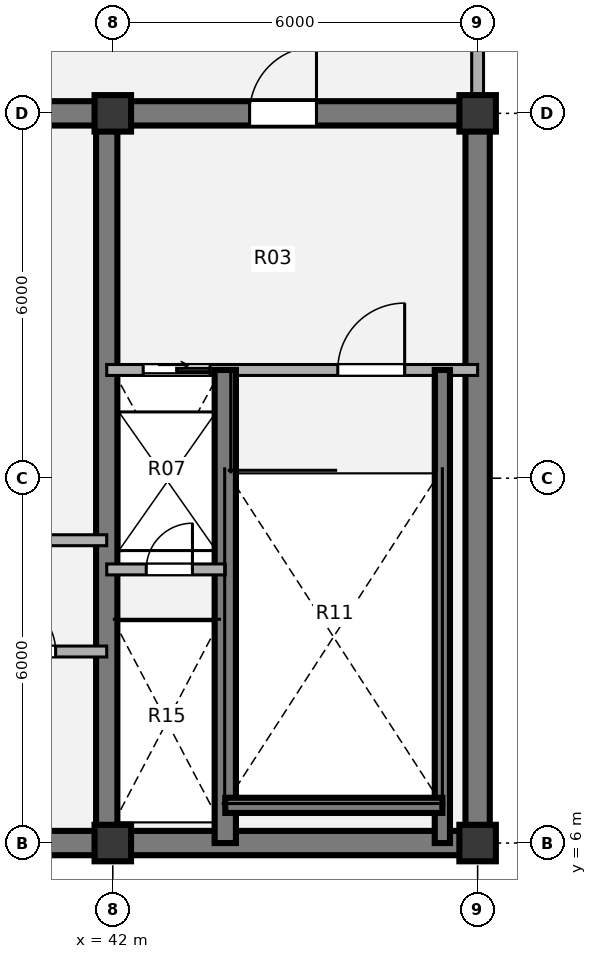
"""IFC4 building model, lengths in metres.
Left out: names, types, materials, properties, quantities, classifications, styles, units other than length and angle.
Written with IfcOpenShell. Run it as: python <this file> out.ifc"""

import sys

from ifc_helpers import new_model, si_unit, direction, frame, frame_2d, origin, origin_2d, place, context, subcontext, project, spatial, rectangle, extrude, source, transform, mapped, element, fill, save


model = new_model("IFC4")
c1 = context("Model", 3, precision=1e-05, world=origin(), true_north=direction((0.0, 1.0)))
c2 = subcontext(c1, "Body", "Model", "MODEL_VIEW")
j1 = project(units=[si_unit("LENGTHUNIT", "METRE"), si_unit("PLANEANGLEUNIT", "RADIAN")], contexts=[c1])
p1 = place(None, origin())
s1 = spatial("IfcSite", under=j1, at=p1, CompositionType="ELEMENT")
p2 = place(p1, origin())
s2 = spatial("IfcBuilding", under=s1, at=p2, CompositionType="ELEMENT")
p3 = place(p2, frame((0.0, 0.0, 315.72)))
s3 = spatial("IfcBuildingStorey", under=s2, at=p3, CompositionType="ELEMENT", Elevation=315.72)
m1 = source(origin(), c2, "Body", "SweptSolid", [
    extrude(rectangle(XDim=0.6, YDim=0.6, at=origin_2d()), origin(), (0.0, 0.0, 1.0), 3.96),
])
for number, where, z_axis, x_axis in (
    (1, (42.0, 6.0, 0.0), (0.0, 0.0, 1.0), (1.0, 0.0, 0.0)),
    (2, (48.0, 6.0, 0.0), (0.0, 0.0, 1.0), (1.0, 0.0, 0.0)),
    (3, (42.0, 18.0, 0.0), (0.0, 0.0, 1.0), (1.0, 0.0, 0.0)),
    (4, (48.0, 18.0, 0.0), (0.0, 0.0, 1.0), (1.0, 0.0, 0.0)),
):
    element("IfcColumn", number, at=place(p3, frame(where, z_axis=z_axis, x_axis=x_axis)), inside=s3, PredefinedType="COLUMN", context=c2, shape_type="MappedRepresentation", body=[
        mapped(m1, transform((0.0, 0.0, 0.0), x_axis=(1.0, 0.0, 0.0), y_axis=(0.0, 1.0, 0.0), z_axis=(0.0, 0.0, 1.0), scale=1.0)),
    ])
p4 = place(p3, frame((48.2, 6.0, 0.0), z_axis=(0.0, 0.0, 1.0), x_axis=(-1.0, 0.0, 0.0)))
e5 = element("IfcWall", 5, at=p4, inside=s3, PredefinedType="SHEAR", context=c2, shape_type="SweptSolid", body=[
    extrude(rectangle(XDim=24.4, YDim=0.4, at=frame_2d((12.2, 0.0))), origin(), (0.0, 0.0, 1.0), 3.96),
])
p5 = place(p3, frame((48.0, 18.0, 0.0), z_axis=(0.0, 0.0, 1.0), x_axis=(0.0, -1.0, 0.0)))
e6 = element("IfcWall", 6, at=p5, inside=s3, PredefinedType="SHEAR", context=c2, shape_type="SweptSolid", body=[
    extrude(rectangle(XDim=12.0, YDim=0.4, at=frame_2d((6.0, 0.0))), origin(), (0.0, 0.0, 1.0), 3.96),
])
p6 = place(p3, frame((38.8, 18.0, 0.0), z_axis=(0.0, 0.0, 1.0), x_axis=(1.0, 0.0, 0.0)))
e7 = element("IfcWall", 7, at=p6, inside=s3, PredefinedType="SHEAR", context=c2, shape_type="SweptSolid", body=[
    extrude(rectangle(XDim=9.4, YDim=0.4, at=frame_2d((4.7, 0.0))), origin(), (0.0, 0.0, 1.0), 3.96),
])
p7 = place(p6, frame((5.45, 0.0, 0.0)))
e8 = element("IfcOpeningElement", 8, at=p7, cuts=e7, PredefinedType="OPENING", context=c2, shape_type="SweptSolid", body=[
    extrude(rectangle(XDim=1.1, YDim=2.1, at=origin_2d()), frame((0.55, 0.21, 1.05), z_axis=(0.0, -1.0, 0.0), x_axis=(1.0, 0.0, 0.0)), (0.0, 0.0, 1.0), 0.42),
])
p8 = place(p3, frame((41.9, 18.0, 0.0), z_axis=(0.0, 0.0, 1.0), x_axis=(0.0, -1.0, 0.0)))
e9 = element("IfcWall", 9, at=p8, inside=s3, PredefinedType="SHEAR", context=c2, shape_type="SweptSolid", body=[
    extrude(rectangle(XDim=12.0, YDim=0.35, at=frame_2d((6.0, 0.0))), origin(), (0.0, 0.0, 1.0), 3.96),
])
p9 = place(p3, frame((48.0, 21.05, 0.0), z_axis=(0.0, 0.0, 1.0), x_axis=(0.0, -1.0, 0.0)))
e10 = element("IfcWall", 10, at=p9, inside=s3, PredefinedType="SOLIDWALL", context=c2, shape_type="SweptSolid", body=[
    extrude(rectangle(XDim=2.77, YDim=0.195, at=frame_2d((1.385, 0.0))), origin(), (0.0, 0.0, 1.0), 2.828),
])
p10 = place(p3, frame((39.35, 10.98, 0.0), z_axis=(0.0, 0.0, 1.0), x_axis=(1.0, 0.0, 0.0)))
e11 = element("IfcWall", 11, at=p10, inside=s3, PredefinedType="PARTITIONING", context=c2, shape_type="SweptSolid", body=[
    extrude(rectangle(XDim=2.55, YDim=0.18, at=frame_2d((1.275, 0.0))), origin(), (0.0, 0.0, 1.0), 3.61),
])
p11 = place(p3, frame((39.35, 9.15, 0.0), z_axis=(0.0, 0.0, 1.0), x_axis=(1.0, 0.0, 0.0)))
e12 = element("IfcWall", 12, at=p11, inside=s3, PredefinedType="PARTITIONING", context=c2, shape_type="SweptSolid", body=[
    extrude(rectangle(XDim=2.55, YDim=0.18, at=frame_2d((1.275, 0.0))), origin(), (0.0, 0.0, 1.0), 3.61),
])
p12 = place(p11, frame((0.85, 0.0, 0.0)))
e13 = element("IfcOpeningElement", 13, at=p12, cuts=e12, PredefinedType="OPENING", context=c2, shape_type="SweptSolid", body=[
    extrude(rectangle(XDim=0.86, YDim=2.1, at=origin_2d()), frame((0.43, 0.1, 1.05), z_axis=(0.0, -1.0, 0.0), x_axis=(1.0, 0.0, 0.0)), (0.0, 0.0, 1.0), 0.2),
])
p13 = place(p3, frame((41.9, 13.78, 0.0), z_axis=(0.0, 0.0, 1.0), x_axis=(1.0, 0.0, 0.0)))
e14 = element("IfcWall", 14, at=p13, inside=s3, PredefinedType="PARTITIONING", context=c2, shape_type="SweptSolid", body=[
    extrude(rectangle(XDim=6.1, YDim=0.18, at=frame_2d((3.05, 0.0))), origin(), (0.0, 0.0, 1.0), 3.61),
])
p14 = place(p13, frame((0.6, 0.0, 0.0)))
e15 = element("IfcOpeningElement", 15, at=p14, cuts=e14, PredefinedType="OPENING", context=c2, shape_type="SweptSolid", body=[
    extrude(rectangle(XDim=1.1, YDim=2.1, at=origin_2d()), frame((0.55, 0.1, 1.05), z_axis=(0.0, -1.0, 0.0), x_axis=(1.0, 0.0, 0.0)), (0.0, 0.0, 1.0), 0.2),
])
p15 = place(p13, frame((3.8, 0.0, 0.0)))
e16 = element("IfcOpeningElement", 16, at=p15, cuts=e14, PredefinedType="OPENING", context=c2, shape_type="SweptSolid", body=[
    extrude(rectangle(XDim=1.1, YDim=2.1, at=origin_2d()), frame((0.55, 0.1, 1.05), z_axis=(0.0, -1.0, 0.0), x_axis=(1.0, 0.0, 0.0)), (0.0, 0.0, 1.0), 0.2),
])
p16 = place(p3, frame((43.85, 6.0, 0.0), z_axis=(0.0, 0.0, 1.0), x_axis=(0.0, 1.0, 0.0)))
e17 = element("IfcWall", 17, at=p16, inside=s3, PredefinedType="SHEAR", context=c2, shape_type="SweptSolid", body=[
    extrude(rectangle(XDim=7.78, YDim=0.35, at=frame_2d((3.89, 0.0))), origin(), (0.0, 0.0, 1.0), 3.96),
])
p17 = place(p3, frame((47.42, 6.0, 0.0), z_axis=(0.0, 0.0, 1.0), x_axis=(0.0, 1.0, 0.0)))
e18 = element("IfcWall", 18, at=p17, inside=s3, PredefinedType="SHEAR", context=c2, shape_type="SweptSolid", body=[
    extrude(rectangle(XDim=7.78, YDim=0.25, at=frame_2d((3.89, 0.0))), origin(), (0.0, 0.0, 1.0), 3.96),
])
p18 = place(p3, frame((43.85, 6.62, 0.0), z_axis=(0.0, 0.0, 1.0), x_axis=(1.0, 0.0, 0.0)))
e19 = element("IfcWall", 19, at=p18, inside=s3, PredefinedType="SHEAR", context=c2, shape_type="SweptSolid", body=[
    extrude(rectangle(XDim=3.57, YDim=0.25, at=frame_2d((1.785, 0.0))), origin(), (0.0, 0.0, 1.0), 3.96),
])
p19 = place(p3, frame((41.9, 10.5, 0.0), z_axis=(0.0, 0.0, 1.0), x_axis=(1.0, 0.0, 0.0)))
e20 = element("IfcWall", 20, at=p19, inside=s3, PredefinedType="PARTITIONING", context=c2, shape_type="SweptSolid", body=[
    extrude(rectangle(XDim=1.95, YDim=0.18, at=frame_2d((0.975, 0.0))), origin(), (0.0, 0.0, 1.0), 3.61),
])
p20 = place(p19, frame((0.65, 0.0, 0.0)))
e21 = element("IfcOpeningElement", 21, at=p20, cuts=e20, PredefinedType="OPENING", context=c2, shape_type="SweptSolid", body=[
    extrude(rectangle(XDim=0.76, YDim=2.05, at=origin_2d()), frame((0.38, 0.1, 1.025), z_axis=(0.0, -1.0, 0.0), x_axis=(1.0, 0.0, 0.0)), (0.0, 0.0, 1.0), 0.2),
])
m2 = source(origin(), c2, "Body", "SweptSolid", [
    extrude(rectangle(XDim=0.86, YDim=2.1, at=origin_2d()), frame((0.43, 0.025, 1.05), z_axis=(0.0, -1.0, 0.0), x_axis=(1.0, 0.0, 0.0)), (0.0, 0.0, 1.0), 0.05),
])
p21 = place(p12, origin())
e22 = element("IfcDoor", 22, at=p21, inside=s3, OperationType="SINGLE_SWING_LEFT", PredefinedType="DOOR", context=c2, shape_type="MappedRepresentation", body=[
    mapped(m2, transform((0.0, 0.0, 0.0), x_axis=(1.0, 0.0, 0.0), y_axis=(0.0, 1.0, 0.0), z_axis=(0.0, 0.0, 1.0), scale=1.0)),
])
fill(e13, e22)
m3 = source(origin(), c2, "Body", "SweptSolid", [
    extrude(rectangle(XDim=1.1, YDim=2.1, at=origin_2d()), frame((0.55, 0.025, 1.05), z_axis=(0.0, -1.0, 0.0), x_axis=(1.0, 0.0, 0.0)), (0.0, 0.0, 1.0), 0.05),
])
p22 = place(p14, origin())
e23 = element("IfcDoor", 23, at=p22, inside=s3, OperationType="SLIDING_TO_RIGHT", PredefinedType="DOOR", context=c2, shape_type="MappedRepresentation", body=[
    mapped(m3, transform((0.0, 0.0, 0.0), x_axis=(1.0, 0.0, 0.0), y_axis=(0.0, 1.0, 0.0), z_axis=(0.0, 0.0, 1.0), scale=1.0)),
])
fill(e15, e23)
m4 = source(origin(), c2, "Body", "SweptSolid", [
    extrude(rectangle(XDim=1.1, YDim=2.1, at=origin_2d()), frame((0.55, 0.025, 1.05), z_axis=(0.0, -1.0, 0.0), x_axis=(1.0, 0.0, 0.0)), (0.0, 0.0, 1.0), 0.05),
])
p23 = place(p15, origin())
e24 = element("IfcDoor", 24, at=p23, inside=s3, OperationType="SINGLE_SWING_RIGHT", PredefinedType="DOOR", context=c2, shape_type="MappedRepresentation", body=[
    mapped(m4, transform((0.0, 0.0, 0.0), x_axis=(1.0, 0.0, 0.0), y_axis=(0.0, 1.0, 0.0), z_axis=(0.0, 0.0, 1.0), scale=1.0)),
])
fill(e16, e24)
m5 = source(origin(), c2, "Body", "SweptSolid", [
    extrude(rectangle(XDim=0.76, YDim=2.05, at=origin_2d()), frame((0.38, 0.025, 1.025), z_axis=(0.0, -1.0, 0.0), x_axis=(1.0, 0.0, 0.0)), (0.0, 0.0, 1.0), 0.05),
])
p24 = place(p20, origin())
e25 = element("IfcDoor", 25, at=p24, inside=s3, OperationType="SINGLE_SWING_RIGHT", PredefinedType="DOOR", context=c2, shape_type="MappedRepresentation", body=[
    mapped(m5, transform((0.0, 0.0, 0.0), x_axis=(1.0, 0.0, 0.0), y_axis=(0.0, 1.0, 0.0), z_axis=(0.0, 0.0, 1.0), scale=1.0)),
])
fill(e21, e25)
m6 = source(origin(), c2, "Body", "SweptSolid", [
    extrude(rectangle(XDim=1.1, YDim=2.1, at=origin_2d()), frame((0.55, 0.025, 1.05), z_axis=(0.0, -1.0, 0.0), x_axis=(1.0, 0.0, 0.0)), (0.0, 0.0, 1.0), 0.05),
])
p25 = place(p7, origin())
e26 = element("IfcDoor", 26, at=p25, inside=s3, OperationType="SINGLE_SWING_RIGHT", PredefinedType="DOOR", context=c2, shape_type="MappedRepresentation", body=[
    mapped(m6, transform((0.0, 0.0, 0.0), x_axis=(1.0, 0.0, 0.0), y_axis=(0.0, 1.0, 0.0), z_axis=(0.0, 0.0, 1.0), scale=1.0)),
])
fill(e8, e26)
save(model, sys.argv[1])
